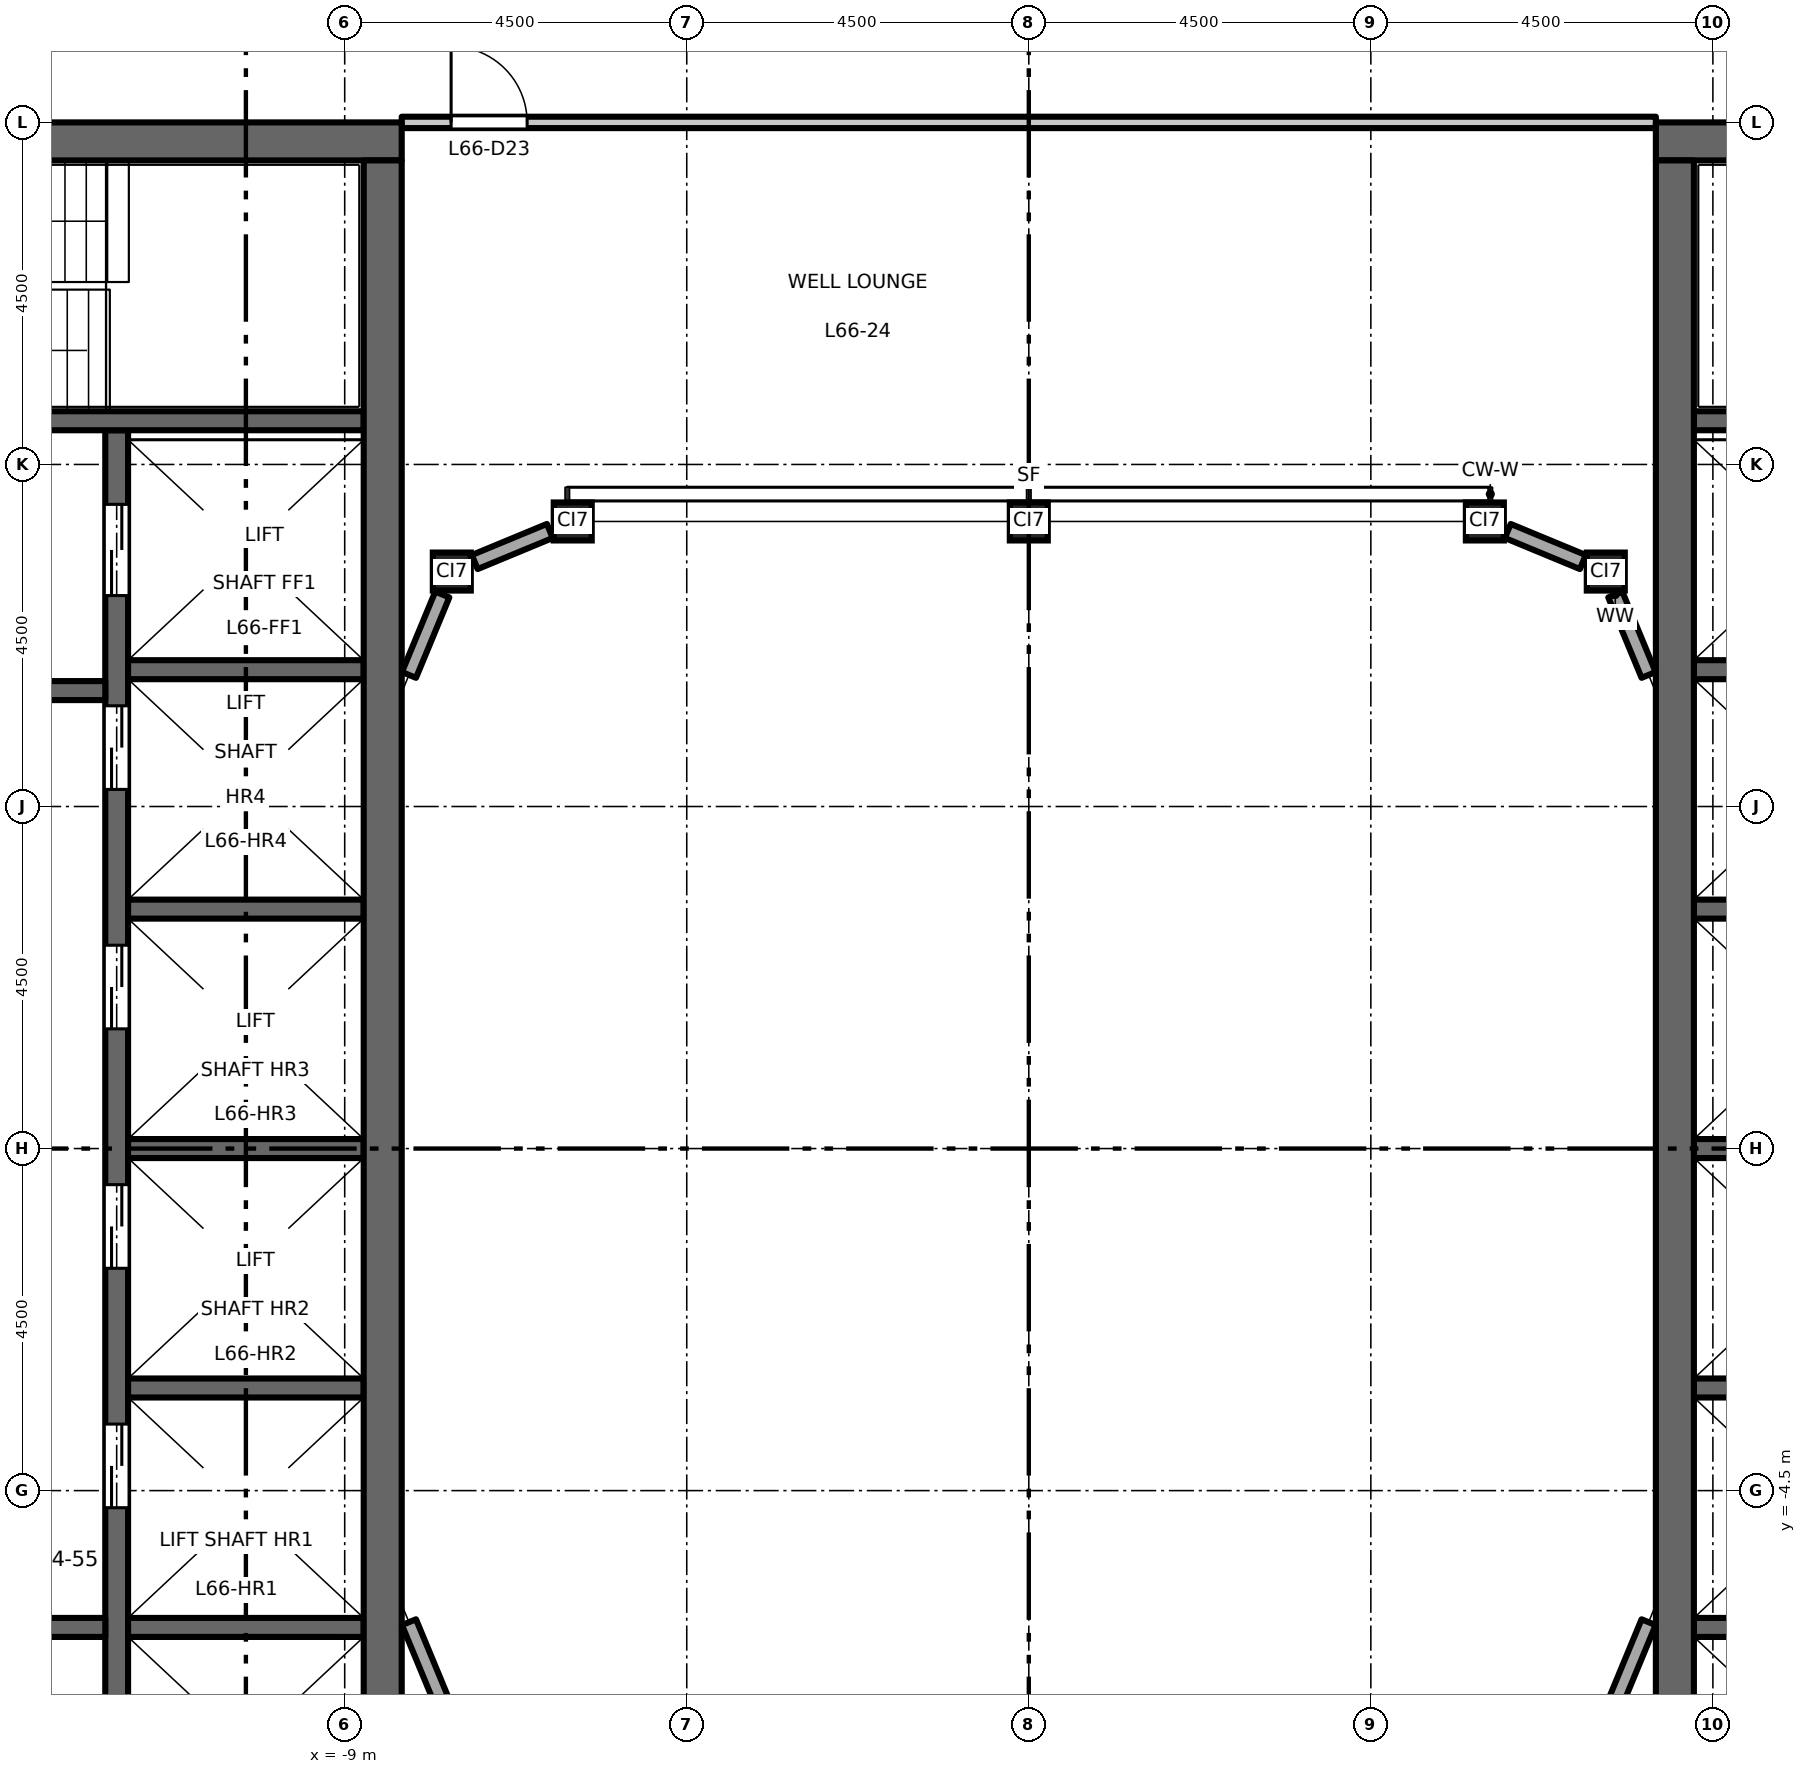
"""IFC4 building model, lengths in metres.
Left out: names, types, materials, properties, quantities, classifications, styles, units other than length and angle.
Written with IfcOpenShell. Run it as: python <this file> out.ifc"""

import sys

from ifc_helpers import new_model, si_unit, direction, frame, frame_2d, origin, origin_2d, place, context, subcontext, project, spatial, rectangle, hollow_rectangle, extrude, element, fill, save


model = new_model("IFC4")
c1 = context("Model", 3, precision=1e-05, world=origin(), true_north=direction((0.0, 1.0)))
c2 = subcontext(c1, "Body", "Model", "MODEL_VIEW")
j1 = project(units=[si_unit("LENGTHUNIT", "METRE"), si_unit("PLANEANGLEUNIT", "RADIAN")], contexts=[c1])
p1 = place(None, origin())
s1 = spatial("IfcSite", under=j1, at=p1, CompositionType="ELEMENT")
p2 = place(p1, origin())
s2 = spatial("IfcBuilding", under=s1, at=p2, CompositionType="ELEMENT")
p3 = place(p2, frame((0.0, 0.0, 307.7)))
s3 = spatial("IfcBuildingStorey", under=s2, at=p3, CompositionType="ELEMENT", Elevation=307.7)
for number, where, z_axis, x_axis in (
    (1, (-7.591, 7.591, 0.0), (0.0, 0.0, 1.0), (1.0, 0.0, 0.0)),
    (2, (-6.0, 8.25, 0.0), (0.0, 0.0, 1.0), (1.0, 0.0, 0.0)),
    (3, (0.0, 8.25, 0.0), (0.0, 0.0, 1.0), (1.0, 0.0, 0.0)),
    (4, (6.0, 8.25, 0.0), (0.0, 0.0, 1.0), (1.0, 0.0, 0.0)),
    (5, (7.591, 7.591, 0.0), (0.0, 0.0, 1.0), (1.0, 0.0, 0.0)),
):
    element("IfcColumn", number, at=place(p3, frame(where, z_axis=z_axis, x_axis=x_axis)), inside=s3, PredefinedType="COLUMN", context=c2, shape_type="SweptSolid", body=[
        extrude(hollow_rectangle(XDim=0.5, YDim=0.5, WallThickness=0.025, at=origin_2d()), origin(), (0.0, 0.0, 1.0), 4.5),
    ])
p4 = place(p3, frame((-12.0, -9.45, 0.0), z_axis=(0.0, 0.0, 1.0), x_axis=(0.0, 1.0, 0.0)))
e6 = element("IfcWall", 6, at=p4, inside=s3, PredefinedType="SHEAR", context=c2, shape_type="SweptSolid", body=[
    extrude(rectangle(XDim=18.9, YDim=0.3, at=frame_2d((9.45, 0.0))), origin(), (0.0, 0.0, 1.0), 4.35),
])
p5 = place(p4, frame((4.725, 0.0, 0.0)))
e7 = element("IfcOpeningElement", 7, at=p5, cuts=e6, PredefinedType="OPENING", context=c2, shape_type="SweptSolid", body=[
    extrude(rectangle(XDim=1.1, YDim=2.1, at=frame_2d((0.55, 1.05))), frame((0.0, 0.16, 0.0), z_axis=(0.0, -1.0, 0.0), x_axis=(1.0, 0.0, 0.0)), (0.0, 0.0, 1.0), 0.32),
])
p6 = place(p4, frame((7.875, 0.0, 0.0)))
e8 = element("IfcOpeningElement", 8, at=p6, cuts=e6, PredefinedType="OPENING", context=c2, shape_type="SweptSolid", body=[
    extrude(rectangle(XDim=1.1, YDim=2.1, at=frame_2d((0.55, 1.05))), frame((0.0, 0.16, 0.0), z_axis=(0.0, -1.0, 0.0), x_axis=(1.0, 0.0, 0.0)), (0.0, 0.0, 1.0), 0.32),
])
p7 = place(p4, frame((11.025, 0.0, 0.0)))
e9 = element("IfcOpeningElement", 9, at=p7, cuts=e6, PredefinedType="OPENING", context=c2, shape_type="SweptSolid", body=[
    extrude(rectangle(XDim=1.1, YDim=2.1, at=frame_2d((0.55, 1.05))), frame((0.0, 0.16, 0.0), z_axis=(0.0, -1.0, 0.0), x_axis=(1.0, 0.0, 0.0)), (0.0, 0.0, 1.0), 0.32),
])
p8 = place(p4, frame((14.175, 0.0, 0.0)))
e10 = element("IfcOpeningElement", 10, at=p8, cuts=e6, PredefinedType="OPENING", context=c2, shape_type="SweptSolid", body=[
    extrude(rectangle(XDim=1.1, YDim=2.1, at=frame_2d((0.55, 1.05))), frame((0.0, 0.16, 0.0), z_axis=(0.0, -1.0, 0.0), x_axis=(1.0, 0.0, 0.0)), (0.0, 0.0, 1.0), 0.32),
])
p9 = place(p4, frame((16.725, 0.0, 0.0)))
e11 = element("IfcOpeningElement", 11, at=p9, cuts=e6, PredefinedType="OPENING", context=c2, shape_type="SweptSolid", body=[
    extrude(rectangle(XDim=1.2, YDim=2.1, at=frame_2d((0.6, 1.05))), frame((0.0, 0.16, 0.0), z_axis=(0.0, -1.0, 0.0), x_axis=(1.0, 0.0, 0.0)), (0.0, 0.0, 1.0), 0.32),
])
p10 = place(p4, frame((0.975, 0.0, 0.0)))
e12 = element("IfcOpeningElement", 12, at=p10, cuts=e6, PredefinedType="OPENING", context=c2, shape_type="SweptSolid", body=[
    extrude(rectangle(XDim=1.2, YDim=2.1, at=frame_2d((0.6, 1.05))), frame((0.0, 0.16, 0.0), z_axis=(0.0, -1.0, 0.0), x_axis=(1.0, 0.0, 0.0)), (0.0, 0.0, 1.0), 0.32),
])
p11 = place(p3, frame((-12.15, 6.025, 0.0), z_axis=(0.0, 0.0, 1.0), x_axis=(-1.0, 0.0, 0.0)))
e13 = element("IfcWall", 13, at=p11, inside=s3, PredefinedType="SHEAR", context=c2, shape_type="SweptSolid", body=[
    extrude(rectangle(XDim=4.6, YDim=0.25, at=frame_2d((2.3, 0.0))), origin(), (0.0, 0.0, 1.0), 4.35),
])
p12 = place(p11, frame((1.8, 0.0, 0.0)))
e14 = element("IfcOpeningElement", 14, at=p12, cuts=e13, PredefinedType="OPENING", context=c2, shape_type="SweptSolid", body=[
    extrude(rectangle(XDim=1.0, YDim=2.1, at=frame_2d((0.5, 1.05))), frame((0.0, 0.135, 0.0), z_axis=(0.0, -1.0, 0.0), x_axis=(1.0, 0.0, 0.0)), (0.0, 0.0, 1.0), 0.27),
])
p13 = place(p3, frame((-12.15, -6.3, 0.0), z_axis=(0.0, 0.0, 1.0), x_axis=(-1.0, 0.0, 0.0)))
e15 = element("IfcWall", 15, at=p13, inside=s3, PredefinedType="SHEAR", context=c2, shape_type="SweptSolid", body=[
    extrude(rectangle(XDim=4.6, YDim=0.25, at=frame_2d((2.3, 0.0))), origin(), (0.0, 0.0, 1.0), 4.35),
])
p14 = place(p13, frame((1.8, 0.0, 0.0)))
e16 = element("IfcOpeningElement", 16, at=p14, cuts=e15, PredefinedType="OPENING", context=c2, shape_type="SweptSolid", body=[
    extrude(rectangle(XDim=1.0, YDim=2.1, at=frame_2d((0.5, 1.05))), frame((0.0, 0.135, 0.0), z_axis=(0.0, -1.0, 0.0), x_axis=(1.0, 0.0, 0.0)), (0.0, 0.0, 1.0), 0.27),
])
for number, where, z_axis, x_axis in (
    (17, (-8.75, 0.0, 0.0), (0.0, 0.0, 1.0), (-1.0, 0.0, 0.0)),
    (18, (-8.75, 3.15, 0.0), (0.0, 0.0, 1.0), (-1.0, 0.0, 0.0)),
    (19, (-8.75, 6.3, 0.0), (0.0, 0.0, 1.0), (-1.0, 0.0, 0.0)),
    (20, (-8.75, -3.15, 0.0), (0.0, 0.0, 1.0), (-1.0, 0.0, 0.0)),
    (21, (-8.75, -6.3, 0.0), (0.0, 0.0, 1.0), (-1.0, 0.0, 0.0)),
):
    element("IfcWall", number, at=place(p3, frame(where, z_axis=z_axis, x_axis=x_axis)), inside=s3, PredefinedType="SHEAR", context=c2, shape_type="SweptSolid", body=[
        extrude(rectangle(XDim=3.1, YDim=0.25, at=frame_2d((1.55, 0.0))), origin(), (0.0, 0.0, 1.0), 4.35),
    ])
p15 = place(p3, frame((-8.75, 9.575, 0.0), z_axis=(0.0, 0.0, 1.0), x_axis=(-1.0, 0.0, 0.0)))
e22 = element("IfcWall", 22, at=p15, inside=s3, PredefinedType="SHEAR", context=c2, shape_type="SweptSolid", body=[
    extrude(rectangle(XDim=8.0, YDim=0.25, at=frame_2d((4.0, 0.0))), origin(), (0.0, 0.0, 1.0), 4.35),
])
p16 = place(p15, frame((6.65, 0.0, 0.0)))
e23 = element("IfcOpeningElement", 23, at=p16, cuts=e22, PredefinedType="OPENING", context=c2, shape_type="SweptSolid", body=[
    extrude(rectangle(XDim=1.1, YDim=2.1, at=frame_2d((0.55, 1.05))), frame((0.0, 0.135, 0.0), z_axis=(0.0, -1.0, 0.0), x_axis=(1.0, 0.0, 0.0)), (0.0, 0.0, 1.0), 0.27),
])
p17 = place(p3, frame((-8.25, 13.25, 0.0), z_axis=(0.0, 0.0, 1.0), x_axis=(-1.0, 0.0, 0.0)))
e24 = element("IfcWall", 24, at=p17, inside=s3, PredefinedType="SHEAR", context=c2, shape_type="SweptSolid", body=[
    extrude(rectangle(XDim=9.0, YDim=0.5, at=frame_2d((4.5, 0.0))), origin(), (0.0, 0.0, 1.0), 4.35),
])
p18 = place(p3, frame((-8.5, -13.0, 0.0), z_axis=(0.0, 0.0, 1.0), x_axis=(0.0, 1.0, 0.0)))
e25 = element("IfcWall", 25, at=p18, inside=s3, PredefinedType="SHEAR", context=c2, shape_type="SweptSolid", body=[
    extrude(rectangle(XDim=26.0, YDim=0.5, at=frame_2d((13.0, 0.0))), origin(), (0.0, 0.0, 1.0), 4.35),
])
for number, where, z_axis, x_axis in (
    (26, (8.75, 0.0, 0.0), (0.0, 0.0, 1.0), (1.0, 0.0, 0.0)),
    (27, (8.75, 3.15, 0.0), (0.0, 0.0, 1.0), (1.0, 0.0, 0.0)),
    (28, (8.75, 6.3, 0.0), (0.0, 0.0, 1.0), (1.0, 0.0, 0.0)),
    (29, (8.75, -3.15, 0.0), (0.0, 0.0, 1.0), (1.0, 0.0, 0.0)),
    (30, (8.75, -6.3, 0.0), (0.0, 0.0, 1.0), (1.0, 0.0, 0.0)),
):
    element("IfcWall", number, at=place(p3, frame(where, z_axis=z_axis, x_axis=x_axis)), inside=s3, PredefinedType="SHEAR", context=c2, shape_type="SweptSolid", body=[
        extrude(rectangle(XDim=3.1, YDim=0.25, at=frame_2d((1.55, 0.0))), origin(), (0.0, 0.0, 1.0), 4.35),
    ])
p19 = place(p3, frame((8.75, 9.575, 0.0), z_axis=(0.0, 0.0, 1.0), x_axis=(1.0, 0.0, 0.0)))
e31 = element("IfcWall", 31, at=p19, inside=s3, PredefinedType="SHEAR", context=c2, shape_type="SweptSolid", body=[
    extrude(rectangle(XDim=8.0, YDim=0.25, at=frame_2d((4.0, 0.0))), origin(), (0.0, 0.0, 1.0), 4.35),
])
p20 = place(p19, frame((6.65, 0.0, 0.0)))
e32 = element("IfcOpeningElement", 32, at=p20, cuts=e31, PredefinedType="OPENING", context=c2, shape_type="SweptSolid", body=[
    extrude(rectangle(XDim=1.1, YDim=2.1, at=frame_2d((0.55, 1.05))), frame((0.0, 0.135, 0.0), z_axis=(0.0, -1.0, 0.0), x_axis=(1.0, 0.0, 0.0)), (0.0, 0.0, 1.0), 0.27),
])
p21 = place(p3, frame((8.25, 13.25, 0.0), z_axis=(0.0, 0.0, 1.0), x_axis=(1.0, 0.0, 0.0)))
e33 = element("IfcWall", 33, at=p21, inside=s3, PredefinedType="SHEAR", context=c2, shape_type="SweptSolid", body=[
    extrude(rectangle(XDim=9.0, YDim=0.5, at=frame_2d((4.5, 0.0))), origin(), (0.0, 0.0, 1.0), 4.35),
])
p22 = place(p3, frame((8.5, -13.0, 0.0), z_axis=(0.0, 0.0, 1.0), x_axis=(0.0, 1.0, 0.0)))
e34 = element("IfcWall", 34, at=p22, inside=s3, PredefinedType="SHEAR", context=c2, shape_type="SweptSolid", body=[
    extrude(rectangle(XDim=26.0, YDim=0.5, at=frame_2d((13.0, 0.0))), origin(), (0.0, 0.0, 1.0), 4.35),
])
for number, where, z_axis, x_axis in (
    (35, (7.716, -7.289, 0.0), (0.0, 0.0, 1.0), (0.383, 0.924, 0.0)),
    (36, (8.154, 6.231, 0.0), (0.0, 0.0, 1.0), (-0.383, 0.924, 0.0)),
):
    element("IfcWall", number, at=place(p3, frame(where, z_axis=z_axis, x_axis=x_axis)), inside=s3, PredefinedType="STANDARD", context=c2, shape_type="SweptSolid", body=[
        extrude(rectangle(XDim=1.146, YDim=0.2, at=frame_2d((0.573, 0.0))), origin(), (0.0, 0.0, 1.0), 4.01),
    ])
for number, where, z_axis, x_axis in (
    (37, (7.289, 7.716, 0.0), (0.0, 0.0, 1.0), (-0.924, 0.383, 0.0)),
    (38, (-6.302, 8.125, 0.0), (0.0, 0.0, 1.0), (-0.924, -0.383, 0.0)),
):
    element("IfcWall", number, at=place(p3, frame(where, z_axis=z_axis, x_axis=x_axis)), inside=s3, PredefinedType="STANDARD", context=c2, shape_type="SweptSolid", body=[
        extrude(rectangle(XDim=1.069, YDim=0.2, at=frame_2d((0.534, 0.0))), origin(), (0.0, 0.0, 1.0), 4.01),
    ])
for number, where, z_axis, x_axis in (
    (39, (-7.716, 7.289, 0.0), (0.0, 0.0, 1.0), (-0.383, -0.924, 0.0)),
    (40, (-8.154, -6.231, 0.0), (0.0, 0.0, 1.0), (0.383, -0.924, 0.0)),
):
    element("IfcWall", number, at=place(p3, frame(where, z_axis=z_axis, x_axis=x_axis)), inside=s3, PredefinedType="STANDARD", context=c2, shape_type="SweptSolid", body=[
        extrude(rectangle(XDim=1.146, YDim=0.2, at=frame_2d((0.573, 0.0))), origin(), (0.0, 0.0, 1.0), 4.01),
    ])
p23 = place(p3, frame((-8.25, 13.5, 0.0), z_axis=(0.0, 0.0, 1.0), x_axis=(1.0, 0.0, 0.0)))
e41 = element("IfcWall", 41, at=p23, inside=s3, PredefinedType="PARTITIONING", context=c2, shape_type="SweptSolid", body=[
    extrude(rectangle(XDim=16.5, YDim=0.15, at=frame_2d((8.25, 0.0))), origin(), (0.0, 0.0, 1.0), 4.35),
])
p24 = place(p23, frame((0.65, 0.0, 0.0)))
e42 = element("IfcOpeningElement", 42, at=p24, cuts=e41, PredefinedType="OPENING", context=c2, shape_type="SweptSolid", body=[
    extrude(rectangle(XDim=1.0, YDim=2.1, at=frame_2d((0.5, 1.05))), frame((0.0, 0.085, 0.0), z_axis=(0.0, -1.0, 0.0), x_axis=(1.0, 0.0, 0.0)), (0.0, 0.0, 1.0), 0.17),
])
p25 = place(p5, origin())
e43 = element("IfcDoor", 43, at=p25, inside=s3, OperationType="DOUBLE_DOOR_SLIDING", PredefinedType="DOOR", context=c2, shape_type="SweptSolid", body=[
    extrude(rectangle(XDim=1.1, YDim=2.1, at=frame_2d((0.55, 1.05))), frame((0.0, 0.025, 0.0), z_axis=(0.0, -1.0, 0.0), x_axis=(1.0, 0.0, 0.0)), (0.0, 0.0, 1.0), 0.05),
])
fill(e7, e43)
p26 = place(p6, origin())
e44 = element("IfcDoor", 44, at=p26, inside=s3, OperationType="DOUBLE_DOOR_SLIDING", PredefinedType="DOOR", context=c2, shape_type="SweptSolid", body=[
    extrude(rectangle(XDim=1.1, YDim=2.1, at=frame_2d((0.55, 1.05))), frame((0.0, 0.025, 0.0), z_axis=(0.0, -1.0, 0.0), x_axis=(1.0, 0.0, 0.0)), (0.0, 0.0, 1.0), 0.05),
])
fill(e8, e44)
p27 = place(p7, origin())
e45 = element("IfcDoor", 45, at=p27, inside=s3, OperationType="DOUBLE_DOOR_SLIDING", PredefinedType="DOOR", context=c2, shape_type="SweptSolid", body=[
    extrude(rectangle(XDim=1.1, YDim=2.1, at=frame_2d((0.55, 1.05))), frame((0.0, 0.025, 0.0), z_axis=(0.0, -1.0, 0.0), x_axis=(1.0, 0.0, 0.0)), (0.0, 0.0, 1.0), 0.05),
])
fill(e9, e45)
p28 = place(p8, origin())
e46 = element("IfcDoor", 46, at=p28, inside=s3, OperationType="DOUBLE_DOOR_SLIDING", PredefinedType="DOOR", context=c2, shape_type="SweptSolid", body=[
    extrude(rectangle(XDim=1.1, YDim=2.1, at=frame_2d((0.55, 1.05))), frame((0.0, 0.025, 0.0), z_axis=(0.0, -1.0, 0.0), x_axis=(1.0, 0.0, 0.0)), (0.0, 0.0, 1.0), 0.05),
])
fill(e10, e46)
p29 = place(p9, origin())
e47 = element("IfcDoor", 47, at=p29, inside=s3, OperationType="DOUBLE_DOOR_SLIDING", PredefinedType="DOOR", context=c2, shape_type="SweptSolid", body=[
    extrude(rectangle(XDim=1.2, YDim=2.1, at=frame_2d((0.6, 1.05))), frame((0.0, 0.025, 0.0), z_axis=(0.0, -1.0, 0.0), x_axis=(1.0, 0.0, 0.0)), (0.0, 0.0, 1.0), 0.05),
])
fill(e11, e47)
p30 = place(p24, origin())
e48 = element("IfcDoor", 48, at=p30, inside=s3, OperationType="SINGLE_SWING_LEFT", PredefinedType="DOOR", context=c2, shape_type="SweptSolid", body=[
    extrude(rectangle(XDim=1.0, YDim=2.1, at=frame_2d((0.5, 1.05))), frame((0.0, 0.025, 0.0), z_axis=(0.0, -1.0, 0.0), x_axis=(1.0, 0.0, 0.0)), (0.0, 0.0, 1.0), 0.05),
])
fill(e42, e48)
save(model, sys.argv[1])
